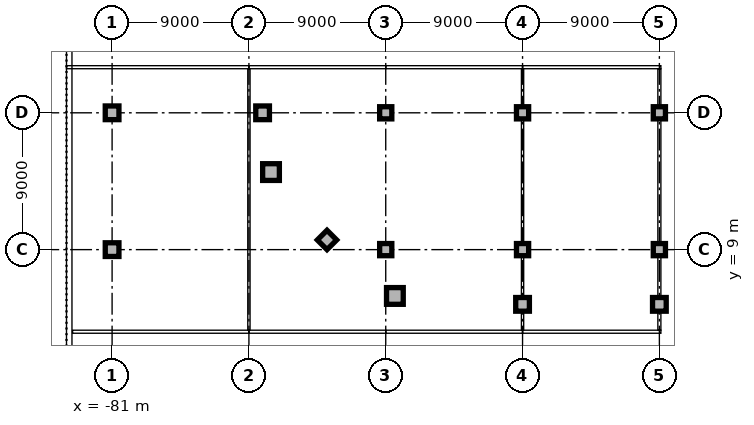
"""IFC4 building model, lengths in metres.
Left out: names, types, materials, properties, quantities, classifications, styles, units other than length and angle.
Written with IfcOpenShell. Run it as: python <this file> out.ifc"""

import sys

from ifc_helpers import new_model, si_unit, direction, frame, frame_2d, origin, origin_2d, place, context, subcontext, project, spatial, rectangle, extrude, element, fill, save


model = new_model("IFC4")
c1 = context("Model", 3, precision=1e-05, world=origin(), true_north=direction((0.0, 1.0)))
c2 = subcontext(c1, "Body", "Model", "MODEL_VIEW")
j1 = project(units=[si_unit("LENGTHUNIT", "METRE"), si_unit("PLANEANGLEUNIT", "RADIAN")], contexts=[c1])
p1 = place(None, origin())
s1 = spatial("IfcSite", under=j1, at=p1, CompositionType="ELEMENT")
p2 = place(p1, origin())
s2 = spatial("IfcBuilding", under=s1, at=p2, CompositionType="ELEMENT")
p3 = place(p2, origin())
s3 = spatial("IfcBuildingStorey", under=s2, at=p3, CompositionType="ELEMENT", Elevation=0.0)
for number, where, z_axis, x_axis in (
    (1, (-62.398, 5.953, 0.0), (0.0, 0.0, 1.0), (1.0, 0.0, 0.0)),
    (2, (-70.547, 14.102, 0.0), (0.0, 0.0, 1.0), (1.0, 0.0, 0.0)),
):
    element("IfcColumn", number, at=place(p3, frame(where, z_axis=z_axis, x_axis=x_axis)), inside=s3, PredefinedType="COLUMN", context=c2, shape_type="SweptSolid", body=[
        extrude(rectangle(XDim=1.1, YDim=1.1, at=origin_2d()), origin(), (0.0, 0.0, 1.0), 5.7),
    ])
for number, where, z_axis, x_axis in (
    (3, (-54.0, 5.4, 0.0), (0.0, 0.0, 1.0), (1.0, 0.0, 0.0)),
    (4, (-45.0, 5.4, 0.0), (0.0, 0.0, 1.0), (1.0, 0.0, 0.0)),
    (5, (-71.1, 18.0, 0.0), (0.0, 0.0, 1.0), (1.0, 0.0, 0.0)),
    (6, (-66.864, 9.636, 0.0), (0.0, 0.0, 1.0), (0.707, 0.707, 0.0)),
):
    element("IfcColumn", number, at=place(p3, frame(where, z_axis=z_axis, x_axis=x_axis)), inside=s3, PredefinedType="COLUMN", context=c2, shape_type="SweptSolid", body=[
        extrude(rectangle(XDim=0.9, YDim=0.9, at=origin_2d()), origin(), (0.0, 0.0, 1.0), 5.7),
    ])
for number, where, z_axis, x_axis in (
    (7, (-63.0, 9.0, 0.0), (0.0, 0.0, 1.0), (1.0, 0.0, 0.0)),
    (8, (-63.0, 18.0, 0.0), (0.0, 0.0, 1.0), (1.0, 0.0, 0.0)),
    (9, (-54.0, 9.0, 0.0), (0.0, 0.0, 1.0), (1.0, 0.0, 0.0)),
    (10, (-54.0, 18.0, 0.0), (0.0, 0.0, 1.0), (1.0, 0.0, 0.0)),
    (11, (-45.0, 9.0, 0.0), (0.0, 0.0, 1.0), (1.0, 0.0, 0.0)),
    (12, (-45.0, 18.0, 0.0), (0.0, 0.0, 1.0), (1.0, 0.0, 0.0)),
):
    element("IfcColumn", number, at=place(p3, frame(where, z_axis=z_axis, x_axis=x_axis)), inside=s3, PredefinedType="COLUMN", context=c2, shape_type="SweptSolid", body=[
        extrude(rectangle(XDim=0.8, YDim=0.8, at=origin_2d()), origin(), (0.0, 0.0, 1.0), 5.7),
    ])
for number, where, z_axis, x_axis in (
    (13, (-81.0, 9.0, 0.0), (0.0, 0.0, 1.0), (1.0, 0.0, 0.0)),
    (14, (-81.0, 18.0, 0.0), (0.0, 0.0, 1.0), (1.0, 0.0, 0.0)),
):
    element("IfcColumn", number, at=place(p3, frame(where, z_axis=z_axis, x_axis=x_axis)), inside=s3, PredefinedType="COLUMN", context=c2, shape_type="SweptSolid", body=[
        extrude(rectangle(XDim=0.9, YDim=0.9, at=origin_2d()), origin(), (0.0, 0.0, 1.0), 5.7),
    ])
p4 = place(p3, frame((-83.82, 54.0, 0.0), z_axis=(0.0, 0.0, 1.0), x_axis=(0.0, -1.0, 0.0)))
e15 = element("IfcWall", 15, at=p4, inside=s3, PredefinedType="STANDARD", context=c2, shape_type="SweptSolid", body=[
    extrude(rectangle(XDim=63.0, YDim=0.36, at=frame_2d((31.5, 0.0))), origin(), (0.0, 0.0, 1.0), 5.7),
])
p5 = place(p4, frame((41.4, 0.0, 0.0)))
e16 = element("IfcOpeningElement", 16, at=p5, cuts=e15, PredefinedType="OPENING", context=c2, shape_type="SweptSolid", body=[
    extrude(rectangle(XDim=1.2, YDim=2.2, at=frame_2d((0.6, 1.1))), frame((0.0, 0.19, 0.0), z_axis=(0.0, -1.0, 0.0), x_axis=(1.0, 0.0, 0.0)), (0.0, 0.0, 1.0), 0.38),
])
p6 = place(p4, frame((30.3, 0.0, 0.0)))
e17 = element("IfcOpeningElement", 17, at=p6, cuts=e15, PredefinedType="OPENING", context=c2, shape_type="SweptSolid", body=[
    extrude(rectangle(XDim=2.4, YDim=2.2, at=frame_2d((1.2, 1.1))), frame((0.0, 0.19, 0.0), z_axis=(0.0, -1.0, 0.0), x_axis=(1.0, 0.0, 0.0)), (0.0, 0.0, 1.0), 0.38),
])
p7 = place(p4, frame((11.85, 0.0, 0.6)))
e18 = element("IfcOpeningElement", 18, at=p7, cuts=e15, PredefinedType="OPENING", context=c2, shape_type="SweptSolid", body=[
    extrude(rectangle(XDim=3.3, YDim=3.0, at=frame_2d((1.65, 1.5))), frame((0.0, 0.19, 0.0), z_axis=(0.0, -1.0, 0.0), x_axis=(1.0, 0.0, 0.0)), (0.0, 0.0, 1.0), 0.38),
])
p8 = place(p4, frame((16.35, 0.0, 0.6)))
e19 = element("IfcOpeningElement", 19, at=p8, cuts=e15, PredefinedType="OPENING", context=c2, shape_type="SweptSolid", body=[
    extrude(rectangle(XDim=3.3, YDim=3.0, at=frame_2d((1.65, 1.5))), frame((0.0, 0.19, 0.0), z_axis=(0.0, -1.0, 0.0), x_axis=(1.0, 0.0, 0.0)), (0.0, 0.0, 1.0), 0.38),
])
p9 = place(p4, frame((20.85, 0.0, 0.6)))
e20 = element("IfcOpeningElement", 20, at=p9, cuts=e15, PredefinedType="OPENING", context=c2, shape_type="SweptSolid", body=[
    extrude(rectangle(XDim=3.3, YDim=3.0, at=frame_2d((1.65, 1.5))), frame((0.0, 0.19, 0.0), z_axis=(0.0, -1.0, 0.0), x_axis=(1.0, 0.0, 0.0)), (0.0, 0.0, 1.0), 0.38),
])
p10 = place(p4, frame((25.35, 0.0, 0.6)))
e21 = element("IfcOpeningElement", 21, at=p10, cuts=e15, PredefinedType="OPENING", context=c2, shape_type="SweptSolid", body=[
    extrude(rectangle(XDim=3.3, YDim=3.0, at=frame_2d((1.65, 1.5))), frame((0.0, 0.19, 0.0), z_axis=(0.0, -1.0, 0.0), x_axis=(1.0, 0.0, 0.0)), (0.0, 0.0, 1.0), 0.38),
])
p11 = place(p4, frame((34.35, 0.0, 0.6)))
e22 = element("IfcOpeningElement", 22, at=p11, cuts=e15, PredefinedType="OPENING", context=c2, shape_type="SweptSolid", body=[
    extrude(rectangle(XDim=3.3, YDim=3.0, at=frame_2d((1.65, 1.5))), frame((0.0, 0.19, 0.0), z_axis=(0.0, -1.0, 0.0), x_axis=(1.0, 0.0, 0.0)), (0.0, 0.0, 1.0), 0.38),
])
p12 = place(p4, frame((43.35, 0.0, 0.6)))
e23 = element("IfcOpeningElement", 23, at=p12, cuts=e15, PredefinedType="OPENING", context=c2, shape_type="SweptSolid", body=[
    extrude(rectangle(XDim=3.3, YDim=3.0, at=frame_2d((1.65, 1.5))), frame((0.0, 0.19, 0.0), z_axis=(0.0, -1.0, 0.0), x_axis=(1.0, 0.0, 0.0)), (0.0, 0.0, 1.0), 0.38),
])
p13 = place(p4, frame((47.85, 0.0, 0.6)))
e24 = element("IfcOpeningElement", 24, at=p13, cuts=e15, PredefinedType="OPENING", context=c2, shape_type="SweptSolid", body=[
    extrude(rectangle(XDim=3.3, YDim=3.0, at=frame_2d((1.65, 1.5))), frame((0.0, 0.19, 0.0), z_axis=(0.0, -1.0, 0.0), x_axis=(1.0, 0.0, 0.0)), (0.0, 0.0, 1.0), 0.38),
])
p14 = place(p4, frame((52.35, 0.0, 0.6)))
e25 = element("IfcOpeningElement", 25, at=p14, cuts=e15, PredefinedType="OPENING", context=c2, shape_type="SweptSolid", body=[
    extrude(rectangle(XDim=3.3, YDim=3.0, at=frame_2d((1.65, 1.5))), frame((0.0, 0.19, 0.0), z_axis=(0.0, -1.0, 0.0), x_axis=(1.0, 0.0, 0.0)), (0.0, 0.0, 1.0), 0.38),
])
p15 = place(p4, frame((56.85, 0.0, 0.6)))
e26 = element("IfcOpeningElement", 26, at=p15, cuts=e15, PredefinedType="OPENING", context=c2, shape_type="SweptSolid", body=[
    extrude(rectangle(XDim=3.3, YDim=3.0, at=frame_2d((1.65, 1.5))), frame((0.0, 0.19, 0.0), z_axis=(0.0, -1.0, 0.0), x_axis=(1.0, 0.0, 0.0)), (0.0, 0.0, 1.0), 0.38),
])
p16 = place(p3, frame((-83.6, 3.6, 0.0), z_axis=(0.0, 0.0, 1.0), x_axis=(1.0, 0.0, 0.0)))
e27 = element("IfcWall", 27, at=p16, inside=s3, PredefinedType="PARTITIONING", context=c2, shape_type="SweptSolid", body=[
    extrude(rectangle(XDim=11.6, YDim=0.2, at=frame_2d((5.8, 0.0))), origin(), (0.0, 0.0, 1.0), 5.7),
])
p17 = place(p16, frame((5.1, 0.0, 0.0)))
e28 = element("IfcOpeningElement", 28, at=p17, cuts=e27, PredefinedType="OPENING", context=c2, shape_type="SweptSolid", body=[
    extrude(rectangle(XDim=1.0, YDim=2.1, at=frame_2d((0.5, 1.05))), frame((0.0, 0.11, 0.0), z_axis=(0.0, -1.0, 0.0), x_axis=(1.0, 0.0, 0.0)), (0.0, 0.0, 1.0), 0.22),
])
p18 = place(p3, frame((-72.0, 3.6, 0.0), z_axis=(0.0, 0.0, 1.0), x_axis=(1.0, 0.0, 0.0)))
e29 = element("IfcWall", 29, at=p18, inside=s3, PredefinedType="PARTITIONING", context=c2, shape_type="SweptSolid", body=[
    extrude(rectangle(XDim=9.0, YDim=0.2, at=frame_2d((4.5, 0.0))), origin(), (0.0, 0.0, 1.0), 5.7),
])
p19 = place(p18, frame((6.9, 0.0, 0.0)))
e30 = element("IfcOpeningElement", 30, at=p19, cuts=e29, PredefinedType="OPENING", context=c2, shape_type="SweptSolid", body=[
    extrude(rectangle(XDim=1.8, YDim=2.1, at=frame_2d((0.9, 1.05))), frame((0.0, 0.11, 0.0), z_axis=(0.0, -1.0, 0.0), x_axis=(1.0, 0.0, 0.0)), (0.0, 0.0, 1.0), 0.22),
])
p20 = place(p3, frame((-63.0, 3.6, 0.0), z_axis=(0.0, 0.0, 1.0), x_axis=(1.0, 0.0, 0.0)))
e31 = element("IfcWall", 31, at=p20, inside=s3, PredefinedType="PARTITIONING", context=c2, shape_type="SweptSolid", body=[
    extrude(rectangle(XDim=9.0, YDim=0.2, at=frame_2d((4.5, 0.0))), origin(), (0.0, 0.0, 1.0), 5.7),
])
p21 = place(p3, frame((-54.0, 3.6, 0.0), z_axis=(0.0, 0.0, 1.0), x_axis=(1.0, 0.0, 0.0)))
e32 = element("IfcWall", 32, at=p21, inside=s3, PredefinedType="PARTITIONING", context=c2, shape_type="SweptSolid", body=[
    extrude(rectangle(XDim=9.1, YDim=0.2, at=frame_2d((4.55, 0.0))), origin(), (0.0, 0.0, 1.0), 5.7),
])
p22 = place(p3, frame((-45.0, 3.7, 0.0), z_axis=(0.0, 0.0, 1.0), x_axis=(0.0, 1.0, 0.0)))
e33 = element("IfcWall", 33, at=p22, inside=s3, PredefinedType="PARTITIONING", context=c2, shape_type="SweptSolid", body=[
    extrude(rectangle(XDim=1.23, YDim=0.2, at=frame_2d((0.615, 0.0))), origin(), (0.0, 0.0, 1.0), 5.7),
])
p23 = place(p3, frame((-45.0, 5.87, 0.0), z_axis=(0.0, 0.0, 1.0), x_axis=(0.0, 1.0, 0.0)))
e34 = element("IfcWall", 34, at=p23, inside=s3, PredefinedType="PARTITIONING", context=c2, shape_type="SweptSolid", body=[
    extrude(rectangle(XDim=2.71, YDim=0.2, at=frame_2d((1.355, 0.0))), origin(), (0.0, 0.0, 1.0), 5.7),
])
p24 = place(p3, frame((-45.0, 9.42, 0.0), z_axis=(0.0, 0.0, 1.0), x_axis=(0.0, 1.0, 0.0)))
e35 = element("IfcWall", 35, at=p24, inside=s3, PredefinedType="PARTITIONING", context=c2, shape_type="SweptSolid", body=[
    extrude(rectangle(XDim=8.16, YDim=0.2, at=frame_2d((4.08, 0.0))), origin(), (0.0, 0.0, 1.0), 5.7),
])
p25 = place(p24, frame((2.38, 0.0, 0.0)))
e36 = element("IfcOpeningElement", 36, at=p25, cuts=e35, PredefinedType="OPENING", context=c2, shape_type="SweptSolid", body=[
    extrude(rectangle(XDim=1.0, YDim=2.1, at=frame_2d((0.5, 1.05))), frame((0.0, 0.11, 0.0), z_axis=(0.0, -1.0, 0.0), x_axis=(1.0, 0.0, 0.0)), (0.0, 0.0, 1.0), 0.22),
])
p26 = place(p3, frame((-45.0, 18.42, 0.0), z_axis=(0.0, 0.0, 1.0), x_axis=(0.0, 1.0, 0.0)))
e37 = element("IfcWall", 37, at=p26, inside=s3, PredefinedType="PARTITIONING", context=c2, shape_type="SweptSolid", body=[
    extrude(rectangle(XDim=2.48, YDim=0.2, at=frame_2d((1.24, 0.0))), origin(), (0.0, 0.0, 1.0), 5.7),
])
p27 = place(p3, frame((-84.0, 21.0, 0.0), z_axis=(0.0, 0.0, 1.0), x_axis=(1.0, 0.0, 0.0)))
e38 = element("IfcWall", 38, at=p27, inside=s3, PredefinedType="PARTITIONING", context=c2, shape_type="SweptSolid", body=[
    extrude(rectangle(XDim=12.0, YDim=0.2, at=frame_2d((6.0, 0.0))), origin(), (0.0, 0.0, 1.0), 5.7),
])
for number, where, z_axis, x_axis in (
    (39, (-63.0, 21.0, 0.0), (0.0, 0.0, 1.0), (1.0, 0.0, 0.0)),
    (40, (-72.0, 21.0, 0.0), (0.0, 0.0, 1.0), (1.0, 0.0, 0.0)),
):
    element("IfcWall", number, at=place(p3, frame(where, z_axis=z_axis, x_axis=x_axis)), inside=s3, PredefinedType="PARTITIONING", context=c2, shape_type="SweptSolid", body=[
        extrude(rectangle(XDim=9.0, YDim=0.2, at=frame_2d((4.5, 0.0))), origin(), (0.0, 0.0, 1.0), 5.7),
    ])
p28 = place(p3, frame((-54.0, 21.0, 0.0), z_axis=(0.0, 0.0, 1.0), x_axis=(1.0, 0.0, 0.0)))
e41 = element("IfcWall", 41, at=p28, inside=s3, PredefinedType="PARTITIONING", context=c2, shape_type="SweptSolid", body=[
    extrude(rectangle(XDim=9.1, YDim=0.2, at=frame_2d((4.55, 0.0))), origin(), (0.0, 0.0, 1.0), 5.7),
])
p29 = place(p3, frame((-72.0, 3.7, 0.0), z_axis=(0.0, 0.0, 1.0), x_axis=(0.0, 1.0, 0.0)))
e42 = element("IfcWall", 42, at=p29, inside=s3, PredefinedType="PARTITIONING", context=c2, shape_type="SweptSolid", body=[
    extrude(rectangle(XDim=17.2, YDim=0.15, at=frame_2d((8.6, 0.0))), origin(), (0.0, 0.0, 1.0), 5.7),
])
p30 = place(p3, frame((-54.0, 3.7, 0.0), z_axis=(0.0, 0.0, 1.0), x_axis=(0.0, 1.0, 0.0)))
e43 = element("IfcWall", 43, at=p30, inside=s3, PredefinedType="PARTITIONING", context=c2, shape_type="SweptSolid", body=[
    extrude(rectangle(XDim=1.23, YDim=0.15, at=frame_2d((0.615, 0.0))), origin(), (0.0, 0.0, 1.0), 5.7),
])
p31 = place(p3, frame((-54.0, 5.87, 0.0), z_axis=(0.0, 0.0, 1.0), x_axis=(0.0, 1.0, 0.0)))
e44 = element("IfcWall", 44, at=p31, inside=s3, PredefinedType="PARTITIONING", context=c2, shape_type="SweptSolid", body=[
    extrude(rectangle(XDim=2.71, YDim=0.15, at=frame_2d((1.355, 0.0))), origin(), (0.0, 0.0, 1.0), 5.7),
])
p32 = place(p3, frame((-54.0, 9.42, 0.0), z_axis=(0.0, 0.0, 1.0), x_axis=(0.0, 1.0, 0.0)))
e45 = element("IfcWall", 45, at=p32, inside=s3, PredefinedType="PARTITIONING", context=c2, shape_type="SweptSolid", body=[
    extrude(rectangle(XDim=8.16, YDim=0.15, at=frame_2d((4.08, 0.0))), origin(), (0.0, 0.0, 1.0), 5.7),
])
p33 = place(p3, frame((-54.0, 18.42, 0.0), z_axis=(0.0, 0.0, 1.0), x_axis=(0.0, 1.0, 0.0)))
e46 = element("IfcWall", 46, at=p33, inside=s3, PredefinedType="PARTITIONING", context=c2, shape_type="SweptSolid", body=[
    extrude(rectangle(XDim=2.48, YDim=0.15, at=frame_2d((1.24, 0.0))), origin(), (0.0, 0.0, 1.0), 5.7),
])
p34 = place(p5, frame((1.2, 0.0, 0.0), z_axis=(0.0, 0.0, 1.0), x_axis=(-1.0, 0.0, 0.0)))
e47 = element("IfcDoor", 47, at=p34, inside=s3, OperationType="SINGLE_SWING_LEFT", PredefinedType="DOOR", context=c2, shape_type="SweptSolid", body=[
    extrude(rectangle(XDim=1.2, YDim=2.2, at=frame_2d((0.6, 1.1))), frame((0.0, -0.07, 0.0), z_axis=(0.0, -1.0, 0.0), x_axis=(1.0, 0.0, 0.0)), (0.0, 0.0, 1.0), 0.05),
])
fill(e16, e47)
p35 = place(p6, frame((2.4, 0.0, 0.0), z_axis=(0.0, 0.0, 1.0), x_axis=(-1.0, 0.0, 0.0)))
e48 = element("IfcDoor", 48, at=p35, inside=s3, OperationType="DOUBLE_DOOR_SINGLE_SWING", PredefinedType="DOOR", context=c2, shape_type="SweptSolid", body=[
    extrude(rectangle(XDim=2.4, YDim=2.2, at=frame_2d((1.2, 1.1))), frame((0.0, -0.07, 0.0), z_axis=(0.0, -1.0, 0.0), x_axis=(1.0, 0.0, 0.0)), (0.0, 0.0, 1.0), 0.05),
])
fill(e17, e48)
p36 = place(p11, origin())
e49 = element("IfcWindow", 49, at=p36, inside=s3, PartitioningType="SINGLE_PANEL", PredefinedType="WINDOW", context=c2, shape_type="SweptSolid", body=[
    extrude(rectangle(XDim=3.3, YDim=3.0, at=frame_2d((1.65, 1.5))), frame((0.0, 0.13, 0.0), z_axis=(0.0, -1.0, 0.0), x_axis=(1.0, 0.0, 0.0)), (0.0, 0.0, 1.0), 0.06),
])
fill(e22, e49)
p37 = place(p12, origin())
e50 = element("IfcWindow", 50, at=p37, inside=s3, PartitioningType="SINGLE_PANEL", PredefinedType="WINDOW", context=c2, shape_type="SweptSolid", body=[
    extrude(rectangle(XDim=3.3, YDim=3.0, at=frame_2d((1.65, 1.5))), frame((0.0, 0.13, 0.0), z_axis=(0.0, -1.0, 0.0), x_axis=(1.0, 0.0, 0.0)), (0.0, 0.0, 1.0), 0.06),
])
fill(e23, e50)
p38 = place(p13, origin())
e51 = element("IfcWindow", 51, at=p38, inside=s3, PartitioningType="SINGLE_PANEL", PredefinedType="WINDOW", context=c2, shape_type="SweptSolid", body=[
    extrude(rectangle(XDim=3.3, YDim=3.0, at=frame_2d((1.65, 1.5))), frame((0.0, 0.13, 0.0), z_axis=(0.0, -1.0, 0.0), x_axis=(1.0, 0.0, 0.0)), (0.0, 0.0, 1.0), 0.06),
])
fill(e24, e51)
p39 = place(p17, origin())
e52 = element("IfcDoor", 52, at=p39, inside=s3, OperationType="SINGLE_SWING_RIGHT", PredefinedType="DOOR", context=c2, shape_type="SweptSolid", body=[
    extrude(rectangle(XDim=1.0, YDim=2.1, at=frame_2d((0.5, 1.05))), frame((0.0, 0.025, 0.0), z_axis=(0.0, -1.0, 0.0), x_axis=(1.0, 0.0, 0.0)), (0.0, 0.0, 1.0), 0.05),
])
fill(e28, e52)
p40 = place(p19, origin())
e53 = element("IfcDoor", 53, at=p40, inside=s3, OperationType="DOUBLE_DOOR_SINGLE_SWING", PredefinedType="DOOR", context=c2, shape_type="SweptSolid", body=[
    extrude(rectangle(XDim=1.8, YDim=2.1, at=frame_2d((0.9, 1.05))), frame((0.0, 0.025, 0.0), z_axis=(0.0, -1.0, 0.0), x_axis=(1.0, 0.0, 0.0)), (0.0, 0.0, 1.0), 0.05),
])
fill(e30, e53)
p41 = place(p25, origin())
e54 = element("IfcDoor", 54, at=p41, inside=s3, OperationType="SINGLE_SWING_LEFT", PredefinedType="DOOR", context=c2, shape_type="SweptSolid", body=[
    extrude(rectangle(XDim=1.0, YDim=2.1, at=frame_2d((0.5, 1.05))), frame((0.0, 0.025, 0.0), z_axis=(0.0, -1.0, 0.0), x_axis=(1.0, 0.0, 0.0)), (0.0, 0.0, 1.0), 0.05),
])
fill(e36, e54)
save(model, sys.argv[1])
